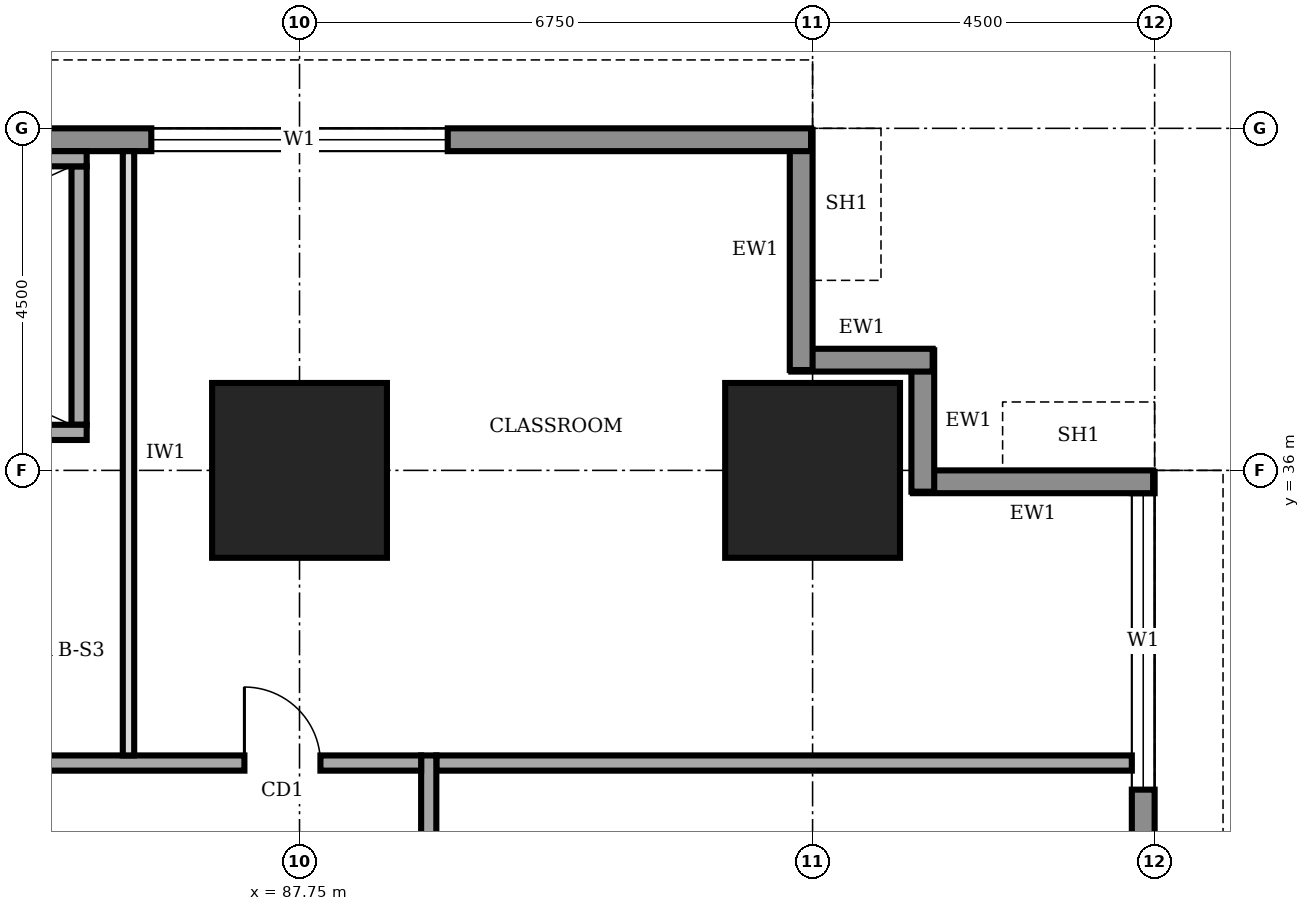
"""IFC4 building model, lengths in metres.
Left out: names, types, materials, properties, quantities, classifications, styles, units other than length and angle.
Written with IfcOpenShell. Run it as: python <this file> out.ifc"""

import sys

from ifc_helpers import new_model, si_unit, direction, frame, frame_2d, origin, origin_2d, place, context, subcontext, project, spatial, rectangle, extrude, element, fill, save


model = new_model("IFC4")
c1 = context("Model", 3, precision=1e-05, world=origin(), true_north=direction((0.0, 1.0)))
c2 = subcontext(c1, "Body", "Model", "MODEL_VIEW")
j1 = project(units=[si_unit("LENGTHUNIT", "METRE"), si_unit("PLANEANGLEUNIT", "RADIAN")], contexts=[c1])
p1 = place(None, origin())
s1 = spatial("IfcSite", under=j1, at=p1, CompositionType="ELEMENT")
p2 = place(p1, origin())
s2 = spatial("IfcBuilding", under=s1, at=p2, CompositionType="ELEMENT")
p3 = place(p2, frame((0.0, 0.0, 45.0)))
s3 = spatial("IfcBuildingStorey", under=s2, at=p3, CompositionType="ELEMENT", Elevation=45.0)
for number, where, z_axis, x_axis in (
    (1, (87.75, 36.0, 0.0), (0.0, 0.0, 1.0), (1.0, 0.0, 0.0)),
    (2, (94.5, 36.0, 0.0), (0.0, 0.0, 1.0), (1.0, 0.0, 0.0)),
):
    element("IfcColumn", number, at=place(p3, frame(where, z_axis=z_axis, x_axis=x_axis)), inside=s3, PredefinedType="COLUMN", context=c2, shape_type="SweptSolid", body=[
        extrude(rectangle(XDim=2.3, YDim=2.3, at=origin_2d()), origin(), (0.0, 0.0, 1.0), 4.0),
    ])
p4 = place(p3, frame((98.85, 4.52, 0.0), z_axis=(0.0, 0.0, 1.0), x_axis=(0.0, 1.0, 0.0)))
e3 = element("IfcWall", 3, at=p4, inside=s3, PredefinedType="STANDARD", context=c2, shape_type="SweptSolid", body=[
    extrude(rectangle(XDim=31.46, YDim=0.3, at=frame_2d((15.73, 0.0))), origin(), (0.0, 0.0, 1.0), 3.75),
])
p5 = place(p4, frame((4.78, 0.0, 0.9)))
e4 = element("IfcOpeningElement", 4, at=p5, cuts=e3, PredefinedType="OPENING", context=c2, shape_type="SweptSolid", body=[
    extrude(rectangle(XDim=3.9, YDim=2.2, at=frame_2d((1.95, 1.1))), frame((0.0, 0.16, 0.0), z_axis=(0.0, -1.0, 0.0), x_axis=(1.0, 0.0, 0.0)), (0.0, 0.0, 1.0), 0.32),
])
p6 = place(p4, frame((9.28, 0.0, 0.9)))
e5 = element("IfcOpeningElement", 5, at=p6, cuts=e3, PredefinedType="OPENING", context=c2, shape_type="SweptSolid", body=[
    extrude(rectangle(XDim=3.9, YDim=2.2, at=frame_2d((1.95, 1.1))), frame((0.0, 0.16, 0.0), z_axis=(0.0, -1.0, 0.0), x_axis=(1.0, 0.0, 0.0)), (0.0, 0.0, 1.0), 0.32),
])
p7 = place(p4, frame((13.78, 0.0, 0.9)))
e6 = element("IfcOpeningElement", 6, at=p7, cuts=e3, PredefinedType="OPENING", context=c2, shape_type="SweptSolid", body=[
    extrude(rectangle(XDim=3.9, YDim=2.2, at=frame_2d((1.95, 1.1))), frame((0.0, 0.16, 0.0), z_axis=(0.0, -1.0, 0.0), x_axis=(1.0, 0.0, 0.0)), (0.0, 0.0, 1.0), 0.32),
])
p8 = place(p4, frame((18.28, 0.0, 0.9)))
e7 = element("IfcOpeningElement", 7, at=p8, cuts=e3, PredefinedType="OPENING", context=c2, shape_type="SweptSolid", body=[
    extrude(rectangle(XDim=3.9, YDim=2.2, at=frame_2d((1.95, 1.1))), frame((0.0, 0.16, 0.0), z_axis=(0.0, -1.0, 0.0), x_axis=(1.0, 0.0, 0.0)), (0.0, 0.0, 1.0), 0.32),
])
p9 = place(p4, frame((22.78, 0.0, 0.9)))
e8 = element("IfcOpeningElement", 8, at=p9, cuts=e3, PredefinedType="OPENING", context=c2, shape_type="SweptSolid", body=[
    extrude(rectangle(XDim=3.9, YDim=2.2, at=frame_2d((1.95, 1.1))), frame((0.0, 0.16, 0.0), z_axis=(0.0, -1.0, 0.0), x_axis=(1.0, 0.0, 0.0)), (0.0, 0.0, 1.0), 0.32),
])
p10 = place(p4, frame((27.28, 0.0, 0.9)))
e9 = element("IfcOpeningElement", 9, at=p10, cuts=e3, PredefinedType="OPENING", context=c2, shape_type="SweptSolid", body=[
    extrude(rectangle(XDim=3.9, YDim=2.2, at=frame_2d((1.95, 1.1))), frame((0.0, 0.16, 0.0), z_axis=(0.0, -1.0, 0.0), x_axis=(1.0, 0.0, 0.0)), (0.0, 0.0, 1.0), 0.32),
])
p11 = place(p3, frame((98.98, 35.85, 0.0), z_axis=(0.0, 0.0, 1.0), x_axis=(-1.0, 0.0, 0.0)))
e10 = element("IfcWall", 10, at=p11, inside=s3, PredefinedType="STANDARD", context=c2, shape_type="SweptSolid", body=[
    extrude(rectangle(XDim=3.16, YDim=0.3, at=frame_2d((1.58, 0.0))), origin(), (0.0, 0.0, 1.0), 2.85),
])
for number, where, z_axis, x_axis in (
    (11, (95.95, 35.72, 0.0), (0.0, 0.0, 1.0), (0.0, 1.0, 0.0)),
    (12, (96.08, 37.45, 0.0), (0.0, 0.0, 1.0), (-1.0, 0.0, 0.0)),
):
    element("IfcWall", number, at=place(p3, frame(where, z_axis=z_axis, x_axis=x_axis)), inside=s3, PredefinedType="STANDARD", context=c2, shape_type="SweptSolid", body=[
        extrude(rectangle(XDim=1.86, YDim=0.3, at=frame_2d((0.93, 0.0))), origin(), (0.0, 0.0, 1.0), 3.75),
    ])
p12 = place(p3, frame((94.35, 37.32, 0.0), z_axis=(0.0, 0.0, 1.0), x_axis=(0.0, 1.0, 0.0)))
e13 = element("IfcWall", 13, at=p12, inside=s3, PredefinedType="STANDARD", context=c2, shape_type="SweptSolid", body=[
    extrude(rectangle(XDim=3.16, YDim=0.3, at=frame_2d((1.58, 0.0))), origin(), (0.0, 0.0, 1.0), 2.85),
])
p13 = place(p3, frame((94.48, 40.35, 0.0), z_axis=(0.0, 0.0, 1.0), x_axis=(-1.0, 0.0, 0.0)))
e14 = element("IfcWall", 14, at=p13, inside=s3, PredefinedType="STANDARD", context=c2, shape_type="SweptSolid", body=[
    extrude(rectangle(XDim=26.96, YDim=0.3, at=frame_2d((13.48, 0.0))), origin(), (0.0, 0.0, 1.0), 3.75),
])
p14 = place(p13, frame((22.78, 0.0, 0.9)))
e15 = element("IfcOpeningElement", 15, at=p14, cuts=e14, PredefinedType="OPENING", context=c2, shape_type="SweptSolid", body=[
    extrude(rectangle(XDim=3.9, YDim=2.2, at=frame_2d((1.95, 1.1))), frame((0.0, 0.16, 0.0), z_axis=(0.0, -1.0, 0.0), x_axis=(1.0, 0.0, 0.0)), (0.0, 0.0, 1.0), 0.32),
])
p15 = place(p13, frame((18.28, 0.0, 0.9)))
e16 = element("IfcOpeningElement", 16, at=p15, cuts=e14, PredefinedType="OPENING", context=c2, shape_type="SweptSolid", body=[
    extrude(rectangle(XDim=3.9, YDim=2.2, at=frame_2d((1.95, 1.1))), frame((0.0, 0.16, 0.0), z_axis=(0.0, -1.0, 0.0), x_axis=(1.0, 0.0, 0.0)), (0.0, 0.0, 1.0), 0.32),
])
p16 = place(p13, frame((4.78, 0.0, 0.9)))
e17 = element("IfcOpeningElement", 17, at=p16, cuts=e14, PredefinedType="OPENING", context=c2, shape_type="SweptSolid", body=[
    extrude(rectangle(XDim=3.9, YDim=2.2, at=frame_2d((1.95, 1.1))), frame((0.0, 0.16, 0.0), z_axis=(0.0, -1.0, 0.0), x_axis=(1.0, 0.0, 0.0)), (0.0, 0.0, 1.0), 0.32),
])
p17 = place(p3, frame((89.45, 8.45, 0.0), z_axis=(0.0, 0.0, 1.0), x_axis=(0.0, 1.0, 0.0)))
e18 = element("IfcWall", 18, at=p17, inside=s3, PredefinedType="SOLIDWALL", context=c2, shape_type="SweptSolid", body=[
    extrude(rectangle(XDim=23.8, YDim=0.2, at=frame_2d((11.9, 0.0))), origin(), (0.0, 0.0, 1.0), 3.75),
])
p18 = place(p17, frame((1.925, 0.0, 0.0)))
e19 = element("IfcOpeningElement", 19, at=p18, cuts=e18, PredefinedType="OPENING", context=c2, shape_type="SweptSolid", body=[
    extrude(rectangle(XDim=1.0, YDim=2.1, at=frame_2d((0.5, 1.05))), frame((0.0, 0.11, 0.0), z_axis=(0.0, -1.0, 0.0), x_axis=(1.0, 0.0, 0.0)), (0.0, 0.0, 1.0), 0.22),
])
p19 = place(p17, frame((6.3, 0.0, 0.0)))
e20 = element("IfcOpeningElement", 20, at=p19, cuts=e18, PredefinedType="OPENING", context=c2, shape_type="SweptSolid", body=[
    extrude(rectangle(XDim=0.9, YDim=2.1, at=frame_2d((0.45, 1.05))), frame((0.0, 0.11, 0.0), z_axis=(0.0, -1.0, 0.0), x_axis=(1.0, 0.0, 0.0)), (0.0, 0.0, 1.0), 0.22),
])
p20 = place(p17, frame((11.1, 0.0, 0.0)))
e21 = element("IfcOpeningElement", 21, at=p20, cuts=e18, PredefinedType="OPENING", context=c2, shape_type="SweptSolid", body=[
    extrude(rectangle(XDim=0.9, YDim=2.1, at=frame_2d((0.45, 1.05))), frame((0.0, 0.11, 0.0), z_axis=(0.0, -1.0, 0.0), x_axis=(1.0, 0.0, 0.0)), (0.0, 0.0, 1.0), 0.22),
])
p21 = place(p17, frame((14.15, 0.0, 0.0)))
e22 = element("IfcOpeningElement", 22, at=p21, cuts=e18, PredefinedType="OPENING", context=c2, shape_type="SweptSolid", body=[
    extrude(rectangle(XDim=0.9, YDim=2.1, at=frame_2d((0.45, 1.05))), frame((0.0, 0.11, 0.0), z_axis=(0.0, -1.0, 0.0), x_axis=(1.0, 0.0, 0.0)), (0.0, 0.0, 1.0), 0.22),
])
p22 = place(p17, frame((17.05, 0.0, 0.0)))
e23 = element("IfcOpeningElement", 23, at=p22, cuts=e18, PredefinedType="OPENING", context=c2, shape_type="SweptSolid", body=[
    extrude(rectangle(XDim=1.0, YDim=2.1, at=frame_2d((0.5, 1.05))), frame((0.0, 0.11, 0.0), z_axis=(0.0, -1.0, 0.0), x_axis=(1.0, 0.0, 0.0)), (0.0, 0.0, 1.0), 0.22),
])
p23 = place(p17, frame((8.95, 0.0, 0.0)))
e24 = element("IfcOpeningElement", 24, at=p23, cuts=e18, PredefinedType="OPENING", context=c2, shape_type="SweptSolid", body=[
    extrude(rectangle(XDim=1.0, YDim=2.1, at=frame_2d((0.5, 1.05))), frame((0.0, 0.11, 0.0), z_axis=(0.0, -1.0, 0.0), x_axis=(1.0, 0.0, 0.0)), (0.0, 0.0, 1.0), 0.22),
])
p24 = place(p17, frame((20.675, 0.0, 0.0)))
e25 = element("IfcOpeningElement", 25, at=p24, cuts=e18, PredefinedType="OPENING", context=c2, shape_type="SweptSolid", body=[
    extrude(rectangle(XDim=1.0, YDim=2.1, at=frame_2d((0.5, 1.05))), frame((0.0, 0.11, 0.0), z_axis=(0.0, -1.0, 0.0), x_axis=(1.0, 0.0, 0.0)), (0.0, 0.0, 1.0), 0.22),
])
p25 = place(p3, frame((89.35, 32.15, 0.0), z_axis=(0.0, 0.0, 1.0), x_axis=(-1.0, 0.0, 0.0)))
e26 = element("IfcWall", 26, at=p25, inside=s3, PredefinedType="SOLIDWALL", context=c2, shape_type="SweptSolid", body=[
    extrude(rectangle(XDim=16.9, YDim=0.2, at=frame_2d((8.45, 0.0))), origin(), (0.0, 0.0, 1.0), 3.75),
])
p26 = place(p25, frame((14.375, 0.0, 0.0)))
e27 = element("IfcOpeningElement", 27, at=p26, cuts=e26, PredefinedType="OPENING", context=c2, shape_type="SweptSolid", body=[
    extrude(rectangle(XDim=1.0, YDim=2.1, at=frame_2d((0.5, 1.05))), frame((0.0, 0.11, 0.0), z_axis=(0.0, -1.0, 0.0), x_axis=(1.0, 0.0, 0.0)), (0.0, 0.0, 1.0), 0.22),
])
p27 = place(p25, frame((7.85, 0.0, 0.0)))
e28 = element("IfcOpeningElement", 28, at=p27, cuts=e26, PredefinedType="OPENING", context=c2, shape_type="SweptSolid", body=[
    extrude(rectangle(XDim=1.0, YDim=2.1, at=frame_2d((0.5, 1.05))), frame((0.0, 0.11, 0.0), z_axis=(0.0, -1.0, 0.0), x_axis=(1.0, 0.0, 0.0)), (0.0, 0.0, 1.0), 0.22),
])
p28 = place(p25, frame((1.325, 0.0, 0.0)))
e29 = element("IfcOpeningElement", 29, at=p28, cuts=e26, PredefinedType="OPENING", context=c2, shape_type="SweptSolid", body=[
    extrude(rectangle(XDim=1.0, YDim=2.1, at=frame_2d((0.5, 1.05))), frame((0.0, 0.11, 0.0), z_axis=(0.0, -1.0, 0.0), x_axis=(1.0, 0.0, 0.0)), (0.0, 0.0, 1.0), 0.22),
])
p29 = place(p3, frame((89.55, 32.15, 0.0), z_axis=(0.0, 0.0, 1.0), x_axis=(1.0, 0.0, 0.0)))
e30 = element("IfcWall", 30, at=p29, inside=s3, PredefinedType="SOLIDWALL", context=c2, shape_type="SweptSolid", body=[
    extrude(rectangle(XDim=9.15, YDim=0.2, at=frame_2d((4.575, 0.0))), origin(), (0.0, 0.0, 1.0), 3.75),
])
p30 = place(p3, frame((85.5, 32.25, 0.0), z_axis=(0.0, 0.0, 1.0), x_axis=(0.0, 1.0, 0.0)))
e31 = element("IfcWall", 31, at=p30, inside=s3, PredefinedType="PARTITIONING", context=c2, shape_type="SweptSolid", body=[
    extrude(rectangle(XDim=7.95, YDim=0.15, at=frame_2d((3.975, 0.0))), origin(), (0.0, 0.0, 1.0), 3.75),
])
p31 = place(p3, frame((77.05, 36.5, 0.0), z_axis=(0.0, 0.0, 1.0), x_axis=(1.0, 0.0, 0.0)))
e32 = element("IfcWall", 32, at=p31, inside=s3, PredefinedType="SOLIDWALL", context=c2, shape_type="SweptSolid", body=[
    extrude(rectangle(XDim=7.9, YDim=0.2, at=frame_2d((3.95, 0.0))), origin(), (0.0, 0.0, 1.0), 3.75),
])
p32 = place(p31, frame((6.3, 0.0, 0.0)))
e33 = element("IfcOpeningElement", 33, at=p32, cuts=e32, PredefinedType="OPENING", context=c2, shape_type="SweptSolid", body=[
    extrude(rectangle(XDim=1.0, YDim=2.1, at=frame_2d((0.5, 1.05))), frame((0.0, 0.11, 0.0), z_axis=(0.0, -1.0, 0.0), x_axis=(1.0, 0.0, 0.0)), (0.0, 0.0, 1.0), 0.22),
])
p33 = place(p3, frame((77.05, 40.1, 0.0), z_axis=(0.0, 0.0, 1.0), x_axis=(1.0, 0.0, 0.0)))
e34 = element("IfcWall", 34, at=p33, inside=s3, PredefinedType="SOLIDWALL", context=c2, shape_type="SweptSolid", body=[
    extrude(rectangle(XDim=7.9, YDim=0.2, at=frame_2d((3.95, 0.0))), origin(), (0.0, 0.0, 1.0), 3.75),
])
p34 = place(p3, frame((84.85, 36.6, 0.0), z_axis=(0.0, 0.0, 1.0), x_axis=(0.0, 1.0, 0.0)))
e35 = element("IfcWall", 35, at=p34, inside=s3, PredefinedType="SOLIDWALL", context=c2, shape_type="SweptSolid", body=[
    extrude(rectangle(XDim=3.4, YDim=0.2, at=frame_2d((1.7, 0.0))), origin(), (0.0, 0.0, 1.0), 3.75),
])
p35 = place(p10, origin())
e36 = element("IfcWindow", 36, at=p35, inside=s3, PartitioningType="SINGLE_PANEL", PredefinedType="WINDOW", context=c2, shape_type="SweptSolid", body=[
    extrude(rectangle(XDim=3.9, YDim=2.2, at=frame_2d((1.95, 1.1))), frame((0.0, 0.03, 0.0), z_axis=(0.0, -1.0, 0.0), x_axis=(1.0, 0.0, 0.0)), (0.0, 0.0, 1.0), 0.06),
])
fill(e9, e36)
p36 = place(p16, origin())
e37 = element("IfcWindow", 37, at=p36, inside=s3, PartitioningType="SINGLE_PANEL", PredefinedType="WINDOW", context=c2, shape_type="SweptSolid", body=[
    extrude(rectangle(XDim=3.9, YDim=2.2, at=frame_2d((1.95, 1.1))), frame((0.0, 0.03, 0.0), z_axis=(0.0, -1.0, 0.0), x_axis=(1.0, 0.0, 0.0)), (0.0, 0.0, 1.0), 0.06),
])
fill(e17, e37)
p37 = place(p28, frame((1.0, 0.0, 0.0), z_axis=(0.0, 0.0, 1.0), x_axis=(-1.0, 0.0, 0.0)))
e38 = element("IfcDoor", 38, at=p37, inside=s3, OperationType="SINGLE_SWING_LEFT", PredefinedType="DOOR", context=c2, shape_type="SweptSolid", body=[
    extrude(rectangle(XDim=1.0, YDim=2.1, at=frame_2d((0.5, 1.05))), frame((0.0, 0.025, 0.0), z_axis=(0.0, -1.0, 0.0), x_axis=(1.0, 0.0, 0.0)), (0.0, 0.0, 1.0), 0.05),
])
fill(e29, e38)
save(model, sys.argv[1])
